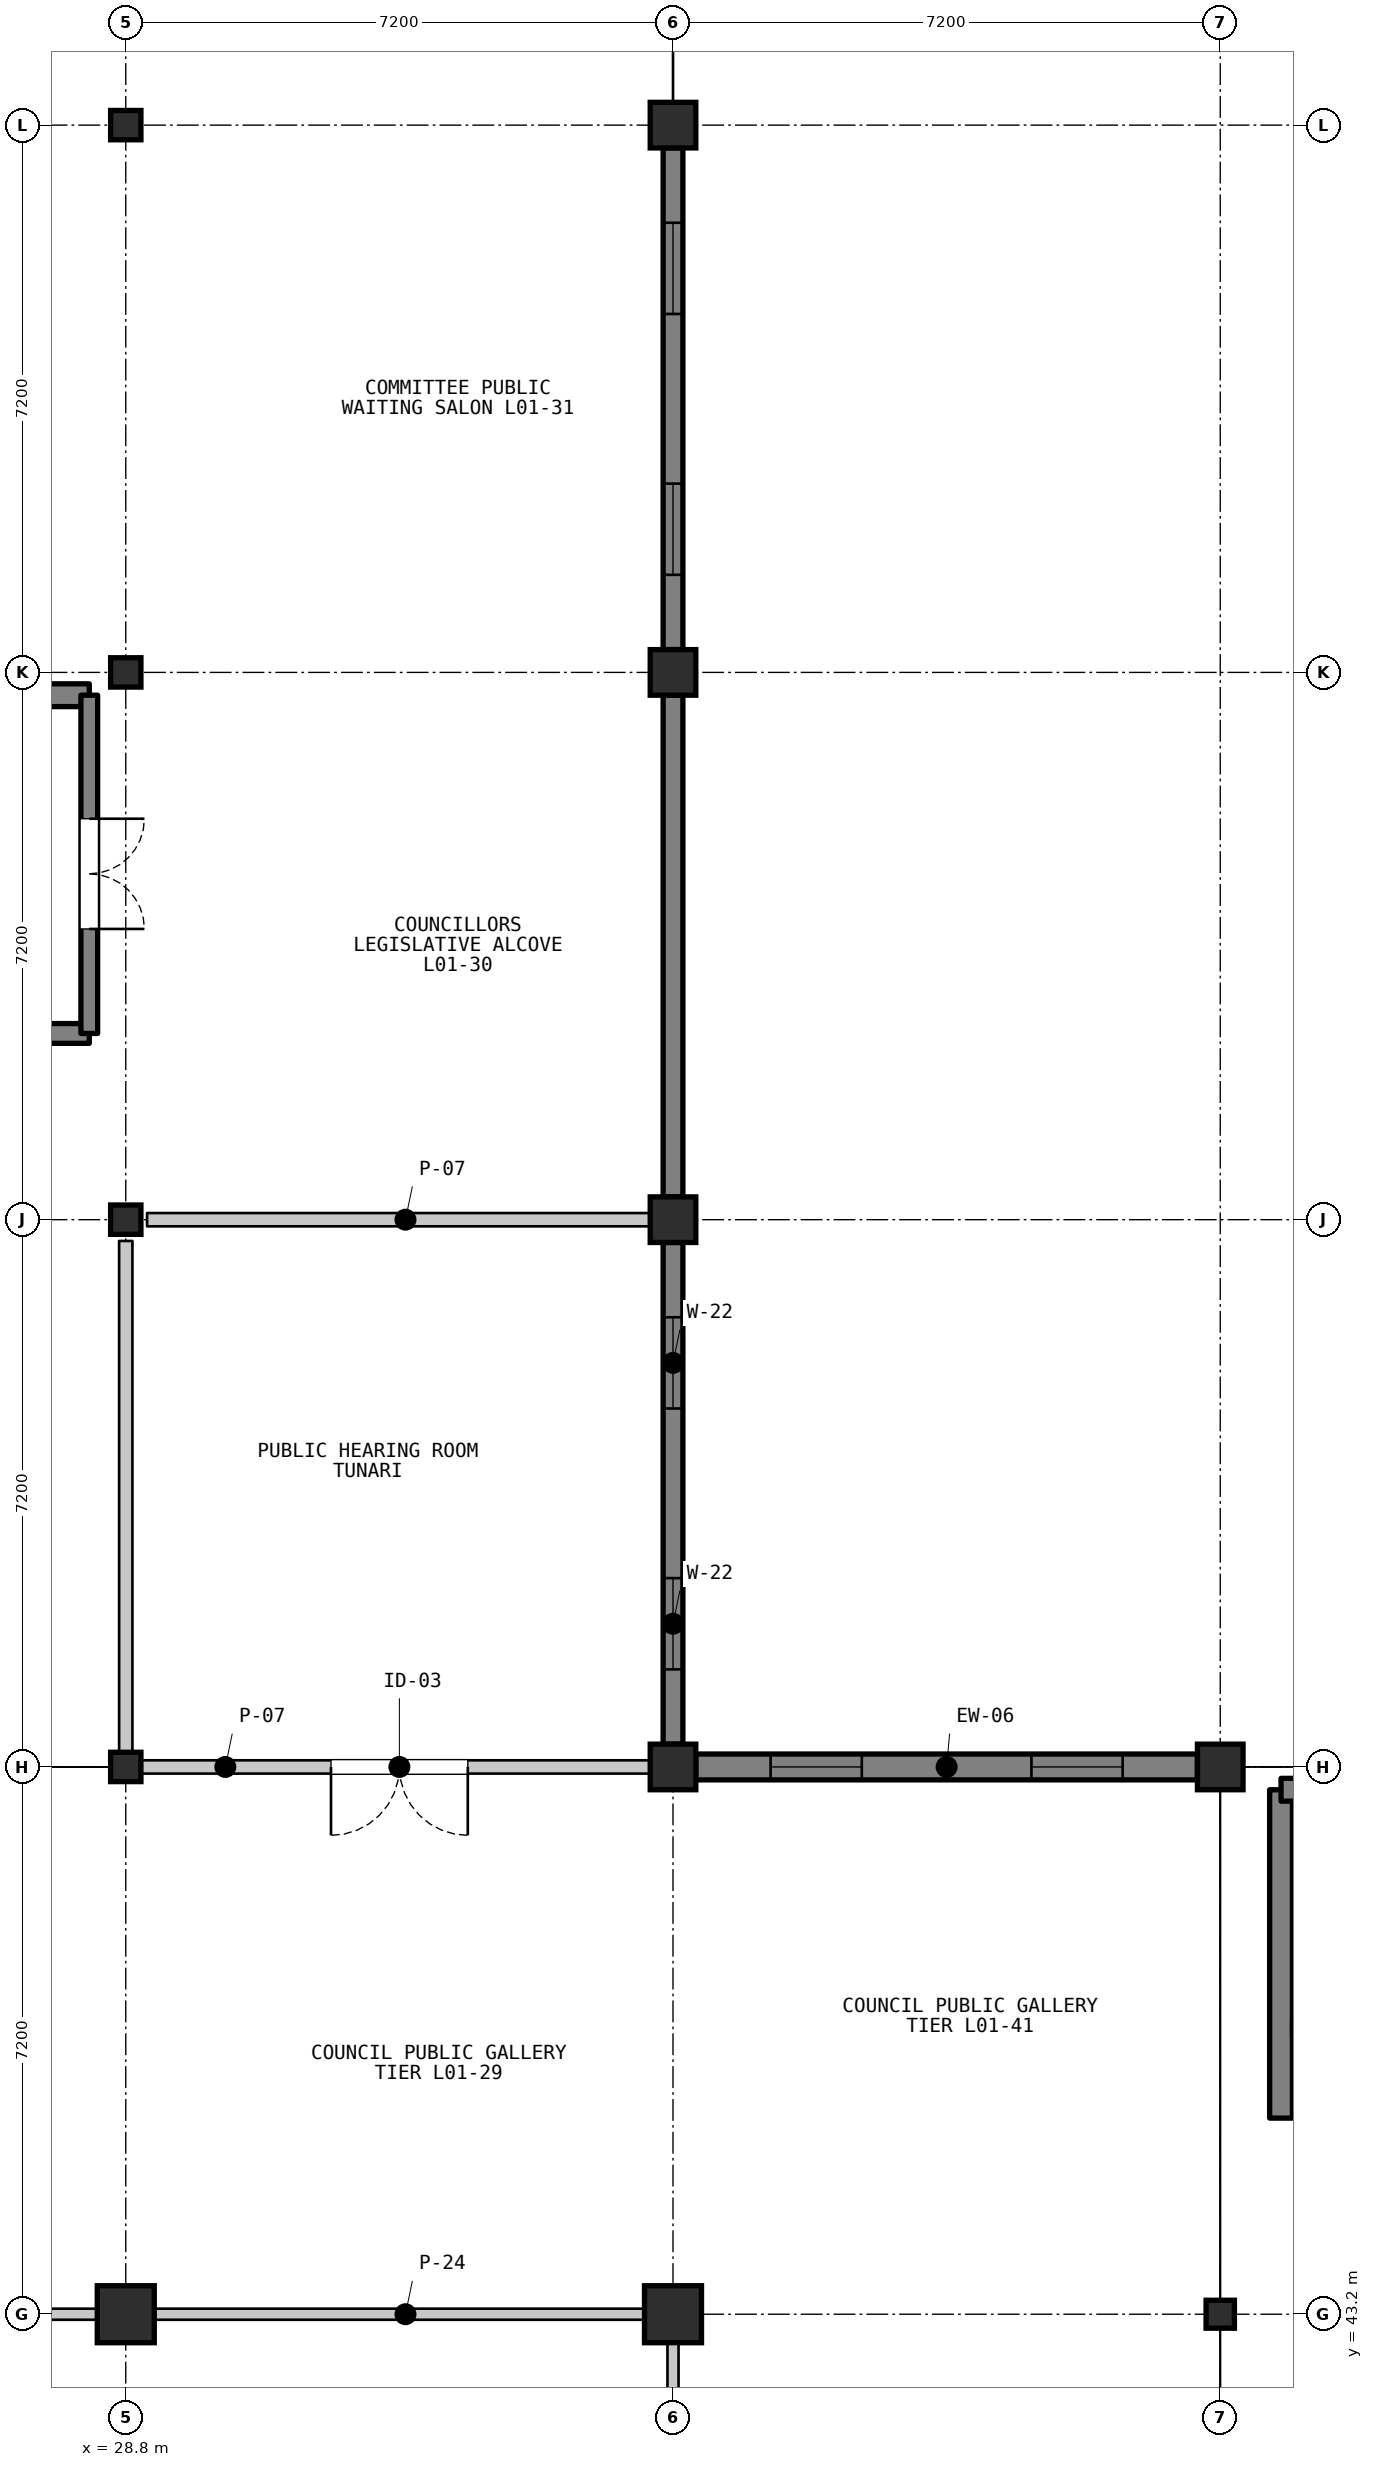
"""IFC4 building model, lengths in metres.
Left out: names, types, materials, properties, quantities, classifications, styles, units other than length and angle.
Written with IfcOpenShell. Run it as: python <this file> out.ifc"""

import sys

from ifc_helpers import new_model, si_unit, direction, frame, frame_2d, origin, origin_2d, place, context, subcontext, project, spatial, rectangle, i_section, extrude, element, fill, save


model = new_model("IFC4")
c1 = context("Model", 3, precision=1e-05, world=origin(), true_north=direction((0.0, 1.0)))
c2 = subcontext(c1, "Body", "Model", "MODEL_VIEW")
j1 = project(units=[si_unit("LENGTHUNIT", "METRE"), si_unit("PLANEANGLEUNIT", "RADIAN")], contexts=[c1])
p1 = place(None, origin())
s1 = spatial("IfcSite", under=j1, at=p1, CompositionType="ELEMENT")
p2 = place(p1, origin())
s2 = spatial("IfcBuilding", under=s1, at=p2, CompositionType="ELEMENT")
p3 = place(p2, origin())
s3 = spatial("IfcBuildingStorey", under=s2, at=p3, CompositionType="ELEMENT", Elevation=0.0)
p4 = place(p3, frame((28.8, 43.2, 0.0), z_axis=(0.0, 0.0, 1.0), x_axis=(1.0, 0.0, 0.0)))
e1 = element("IfcColumn", 1, at=p4, inside=s3, PredefinedType="COLUMN", context=c2, shape_type="SweptSolid", body=[
    extrude(rectangle(XDim=0.75, YDim=0.75, at=origin_2d()), origin(), (0.0, 0.0, 1.0), 5.4),
])
for number, where, z_axis, x_axis in (
    (2, (28.8, 50.4, 0.0), (0.0, 0.0, 1.0), (1.0, 0.0, 0.0)),
    (3, (28.8, 57.6, 0.0), (0.0, 0.0, 1.0), (1.0, 0.0, 0.0)),
    (4, (28.8, 64.8, 0.0), (0.0, 0.0, 1.0), (1.0, 0.0, 0.0)),
    (5, (28.8, 72.0, 0.0), (0.0, 0.0, 1.0), (1.0, 0.0, 0.0)),
):
    element("IfcColumn", number, at=place(p3, frame(where, z_axis=z_axis, x_axis=x_axis)), inside=s3, PredefinedType="COLUMN", context=c2, shape_type="SweptSolid", body=[
        extrude(i_section(OverallWidth=0.399, OverallDepth=0.386, WebThickness=0.021, FlangeThickness=0.033, FilletRadius=0.015, at=origin_2d()), origin(), (0.0, 0.0, 1.0), 5.4),
    ])
p5 = place(p3, frame((36.0, 43.2, 0.0), z_axis=(0.0, 0.0, 1.0), x_axis=(1.0, 0.0, 0.0)))
e6 = element("IfcColumn", 6, at=p5, inside=s3, PredefinedType="COLUMN", context=c2, shape_type="SweptSolid", body=[
    extrude(rectangle(XDim=0.75, YDim=0.75, at=origin_2d()), origin(), (0.0, 0.0, 1.0), 5.4),
])
for number, where, z_axis, x_axis in (
    (7, (36.0, 50.4, 0.0), (0.0, 0.0, 1.0), (1.0, 0.0, 0.0)),
    (8, (36.0, 57.6, 0.0), (0.0, 0.0, 1.0), (1.0, 0.0, 0.0)),
    (9, (36.0, 64.8, 0.0), (0.0, 0.0, 1.0), (1.0, 0.0, 0.0)),
    (10, (36.0, 72.0, 0.0), (0.0, 0.0, 1.0), (1.0, 0.0, 0.0)),
):
    element("IfcColumn", number, at=place(p3, frame(where, z_axis=z_axis, x_axis=x_axis)), inside=s3, PredefinedType="COLUMN", context=c2, shape_type="SweptSolid", body=[
        extrude(rectangle(XDim=0.6, YDim=0.6, at=origin_2d()), origin(), (0.0, 0.0, 1.0), 5.4),
    ])
p6 = place(p3, frame((43.2, 43.2, 0.0), z_axis=(0.0, 0.0, 1.0), x_axis=(1.0, 0.0, 0.0)))
e11 = element("IfcColumn", 11, at=p6, inside=s3, PredefinedType="COLUMN", context=c2, shape_type="SweptSolid", body=[
    extrude(i_section(OverallWidth=0.373, OverallDepth=0.368, WebThickness=0.015, FlangeThickness=0.024, FilletRadius=0.015, at=origin_2d()), origin(), (0.0, 0.0, 1.0), 5.4),
])
p7 = place(p3, frame((43.2, 50.4, 0.0), z_axis=(0.0, 0.0, 1.0), x_axis=(1.0, 0.0, 0.0)))
e12 = element("IfcColumn", 12, at=p7, inside=s3, PredefinedType="COLUMN", context=c2, shape_type="SweptSolid", body=[
    extrude(rectangle(XDim=0.6, YDim=0.6, at=origin_2d()), origin(), (0.0, 0.0, 1.0), 5.4),
])
p8 = place(p3, frame((36.0, 57.3, 0.0), z_axis=(0.0, 0.0, 1.0), x_axis=(0.0, -1.0, 0.0)))
e13 = element("IfcWall", 13, at=p8, inside=s3, PredefinedType="SOLIDWALL", context=c2, shape_type="SweptSolid", body=[
    extrude(rectangle(XDim=6.6, YDim=0.26, at=frame_2d((3.3, 0.0))), origin(), (0.0, 0.0, 1.0), 4.667),
])
p9 = place(p8, frame((0.984, 0.0, 0.95)))
e14 = element("IfcOpeningElement", 14, at=p9, cuts=e13, PredefinedType="OPENING", context=c2, shape_type="SweptSolid", body=[
    extrude(rectangle(XDim=1.2, YDim=1.7, at=frame_2d((0.6, 0.85))), frame((0.0, 0.14, 0.0), z_axis=(0.0, -1.0, 0.0), x_axis=(1.0, 0.0, 0.0)), (0.0, 0.0, 1.0), 0.28),
])
p10 = place(p8, frame((4.416, 0.0, 0.95)))
e15 = element("IfcOpeningElement", 15, at=p10, cuts=e13, PredefinedType="OPENING", context=c2, shape_type="SweptSolid", body=[
    extrude(rectangle(XDim=1.2, YDim=1.7, at=frame_2d((0.6, 0.85))), frame((0.0, 0.14, 0.0), z_axis=(0.0, -1.0, 0.0), x_axis=(1.0, 0.0, 0.0)), (0.0, 0.0, 1.0), 0.28),
])
p11 = place(p3, frame((36.0, 64.5, 0.0), z_axis=(0.0, 0.0, 1.0), x_axis=(0.0, -1.0, 0.0)))
e16 = element("IfcWall", 16, at=p11, inside=s3, PredefinedType="SOLIDWALL", context=c2, shape_type="SweptSolid", body=[
    extrude(rectangle(XDim=6.6, YDim=0.26, at=frame_2d((3.3, 0.0))), origin(), (0.0, 0.0, 1.0), 4.667),
])
p12 = place(p3, frame((36.0, 71.7, 0.0), z_axis=(0.0, 0.0, 1.0), x_axis=(0.0, -1.0, 0.0)))
e17 = element("IfcWall", 17, at=p12, inside=s3, PredefinedType="SOLIDWALL", context=c2, shape_type="SweptSolid", body=[
    extrude(rectangle(XDim=6.6, YDim=0.26, at=frame_2d((3.3, 0.0))), origin(), (0.0, 0.0, 1.0), 4.667),
])
p13 = place(p12, frame((0.984, 0.0, 0.95)))
e18 = element("IfcOpeningElement", 18, at=p13, cuts=e17, PredefinedType="OPENING", context=c2, shape_type="SweptSolid", body=[
    extrude(rectangle(XDim=1.2, YDim=1.7, at=frame_2d((0.6, 0.85))), frame((0.0, 0.14, 0.0), z_axis=(0.0, -1.0, 0.0), x_axis=(1.0, 0.0, 0.0)), (0.0, 0.0, 1.0), 0.28),
])
p14 = place(p12, frame((4.416, 0.0, 0.95)))
e19 = element("IfcOpeningElement", 19, at=p14, cuts=e17, PredefinedType="OPENING", context=c2, shape_type="SweptSolid", body=[
    extrude(rectangle(XDim=1.2, YDim=1.7, at=frame_2d((0.6, 0.85))), frame((0.0, 0.14, 0.0), z_axis=(0.0, -1.0, 0.0), x_axis=(1.0, 0.0, 0.0)), (0.0, 0.0, 1.0), 0.28),
])
p15 = place(p3, frame((36.3, 50.4, 0.0), z_axis=(0.0, 0.0, 1.0), x_axis=(1.0, 0.0, 0.0)))
e20 = element("IfcWall", 20, at=p15, inside=s3, PredefinedType="SOLIDWALL", context=c2, shape_type="SweptSolid", body=[
    extrude(rectangle(XDim=6.6, YDim=0.34, at=frame_2d((3.3, 0.0))), origin(), (0.0, 0.0, 1.0), 4.598),
])
p16 = place(p15, frame((0.984, 0.0, 0.95)))
e21 = element("IfcOpeningElement", 21, at=p16, cuts=e20, PredefinedType="OPENING", context=c2, shape_type="SweptSolid", body=[
    extrude(rectangle(XDim=1.2, YDim=1.7, at=frame_2d((0.6, 0.85))), frame((0.0, 0.18, 0.0), z_axis=(0.0, -1.0, 0.0), x_axis=(1.0, 0.0, 0.0)), (0.0, 0.0, 1.0), 0.36),
])
p17 = place(p15, frame((4.416, 0.0, 0.95)))
e22 = element("IfcOpeningElement", 22, at=p17, cuts=e20, PredefinedType="OPENING", context=c2, shape_type="SweptSolid", body=[
    extrude(rectangle(XDim=1.2, YDim=1.7, at=frame_2d((0.6, 0.85))), frame((0.0, 0.18, 0.0), z_axis=(0.0, -1.0, 0.0), x_axis=(1.0, 0.0, 0.0)), (0.0, 0.0, 1.0), 0.36),
])
p18 = place(p3, frame((44.0, 45.78, 0.0), z_axis=(0.0, 0.0, 1.0), x_axis=(0.0, 1.0, 0.0)))
e23 = element("IfcWall", 23, at=p18, inside=s3, PredefinedType="SHEAR", context=c2, shape_type="SweptSolid", body=[
    extrude(rectangle(XDim=4.32, YDim=0.3, at=frame_2d((2.16, 0.0))), origin(), (0.0, 0.0, 1.0), 5.2),
])
p19 = place(p3, frame((44.0, 50.1, 0.0), z_axis=(0.0, 0.0, 1.0), x_axis=(1.0, 0.0, 0.0)))
e24 = element("IfcWall", 24, at=p19, inside=s3, PredefinedType="SHEAR", context=c2, shape_type="SweptSolid", body=[
    extrude(rectangle(XDim=5.92, YDim=0.3, at=frame_2d((2.96, 0.0))), origin(), (0.0, 0.0, 1.0), 5.2),
])
p20 = place(p3, frame((44.15, 46.95, 0.0), z_axis=(0.0, 0.0, 1.0), x_axis=(1.0, 0.0, 0.0)))
e25 = element("IfcWall", 25, at=p20, inside=s3, PredefinedType="SHEAR", context=c2, shape_type="SweptSolid", body=[
    extrude(rectangle(XDim=2.4, YDim=0.22, at=frame_2d((1.2, 0.0))), origin(), (0.0, 0.0, 1.0), 5.2),
])
p21 = place(p3, frame((22.91, 60.05, 0.0), z_axis=(0.0, 0.0, 1.0), x_axis=(1.0, 0.0, 0.0)))
e26 = element("IfcWall", 26, at=p21, inside=s3, PredefinedType="SHEAR", context=c2, shape_type="SweptSolid", body=[
    extrude(rectangle(XDim=5.41, YDim=0.26, at=frame_2d((2.705, 0.0))), origin(), (0.0, 0.0, 1.0), 5.2),
])
p22 = place(p21, frame((2.84, 0.0, 0.0)))
e27 = element("IfcOpeningElement", 27, at=p22, cuts=e26, PredefinedType="OPENING", context=c2, shape_type="SweptSolid", body=[
    extrude(rectangle(XDim=1.15, YDim=2.15, at=frame_2d((0.575, 1.075))), frame((0.0, 0.14, 0.0), z_axis=(0.0, -1.0, 0.0), x_axis=(1.0, 0.0, 0.0)), (0.0, 0.0, 1.0), 0.28),
])
p23 = place(p3, frame((22.4, 64.5, 0.0), z_axis=(0.0, 0.0, 1.0), x_axis=(1.0, 0.0, 0.0)))
e28 = element("IfcWall", 28, at=p23, inside=s3, PredefinedType="SHEAR", context=c2, shape_type="SweptSolid", body=[
    extrude(rectangle(XDim=5.92, YDim=0.3, at=frame_2d((2.96, 0.0))), origin(), (0.0, 0.0, 1.0), 5.2),
])
p24 = place(p3, frame((28.32, 64.5, 0.0), z_axis=(0.0, 0.0, 1.0), x_axis=(0.0, -1.0, 0.0)))
e29 = element("IfcWall", 29, at=p24, inside=s3, PredefinedType="SHEAR", context=c2, shape_type="SweptSolid", body=[
    extrude(rectangle(XDim=4.45, YDim=0.22, at=frame_2d((2.225, 0.0))), origin(), (0.0, 0.0, 1.0), 5.2),
])
p25 = place(p24, frame((1.625, 0.0, 0.0)))
e30 = element("IfcOpeningElement", 30, at=p25, cuts=e29, PredefinedType="OPENING", context=c2, shape_type="SweptSolid", body=[
    extrude(rectangle(XDim=1.45, YDim=2.2, at=frame_2d((0.725, 1.1))), frame((0.0, 0.12, 0.0), z_axis=(0.0, -1.0, 0.0), x_axis=(1.0, 0.0, 0.0)), (0.0, 0.0, 1.0), 0.24),
])
p26 = place(p3, frame((21.88, 43.2, 0.0), z_axis=(0.0, 0.0, 1.0), x_axis=(1.0, 0.0, 0.0)))
e31 = element("IfcWall", 31, at=p26, inside=s3, PredefinedType="PARTITIONING", context=c2, shape_type="SweptSolid", body=[
    extrude(rectangle(XDim=6.64, YDim=0.146, at=frame_2d((3.32, 0.0))), origin(), (0.0, 0.0, 1.0), 4.588),
])
p27 = place(p3, frame((29.08, 43.2, 0.0), z_axis=(0.0, 0.0, 1.0), x_axis=(1.0, 0.0, 0.0)))
e32 = element("IfcWall", 32, at=p27, inside=s3, PredefinedType="PARTITIONING", context=c2, shape_type="SweptSolid", body=[
    extrude(rectangle(XDim=6.8, YDim=0.146, at=frame_2d((3.4, 0.0))), origin(), (0.0, 0.0, 1.0), 4.588),
])
p28 = place(p3, frame((36.0, 43.08, 0.0), z_axis=(0.0, 0.0, 1.0), x_axis=(0.0, -1.0, 0.0)))
e33 = element("IfcWall", 33, at=p28, inside=s3, PredefinedType="PARTITIONING", context=c2, shape_type="SweptSolid", body=[
    extrude(rectangle(XDim=6.96, YDim=0.146, at=frame_2d((3.48, 0.0))), origin(), (0.0, 0.0, 1.0), 4.588),
])
p29 = place(p3, frame((35.88, 50.4, 0.0), z_axis=(0.0, 0.0, 1.0), x_axis=(-1.0, 0.0, 0.0)))
e34 = element("IfcWall", 34, at=p29, inside=s3, PredefinedType="PARTITIONING", context=c2, shape_type="SweptSolid", body=[
    extrude(rectangle(XDim=6.96, YDim=0.175, at=frame_2d((3.48, 0.0))), origin(), (0.0, 0.0, 1.0), 4.588),
])
p30 = place(p29, frame((2.58, 0.0, 0.0)))
e35 = element("IfcOpeningElement", 35, at=p30, cuts=e34, PredefinedType="OPENING", context=c2, shape_type="SweptSolid", body=[
    extrude(rectangle(XDim=1.8, YDim=2.4, at=frame_2d((0.9, 1.2))), frame((0.0, 0.097, 0.0), z_axis=(0.0, -1.0, 0.0), x_axis=(1.0, 0.0, 0.0)), (0.0, 0.0, 1.0), 0.195),
])
p31 = place(p3, frame((29.08, 57.6, 0.0), z_axis=(0.0, 0.0, 1.0), x_axis=(1.0, 0.0, 0.0)))
e36 = element("IfcWall", 36, at=p31, inside=s3, PredefinedType="PARTITIONING", context=c2, shape_type="SweptSolid", body=[
    extrude(rectangle(XDim=6.8, YDim=0.175, at=frame_2d((3.4, 0.0))), origin(), (0.0, 0.0, 1.0), 4.588),
])
p32 = place(p3, frame((28.8, 50.52, 0.0), z_axis=(0.0, 0.0, 1.0), x_axis=(0.0, 1.0, 0.0)))
e37 = element("IfcWall", 37, at=p32, inside=s3, PredefinedType="PARTITIONING", context=c2, shape_type="SweptSolid", body=[
    extrude(rectangle(XDim=6.8, YDim=0.175, at=frame_2d((3.4, 0.0))), origin(), (0.0, 0.0, 1.0), 4.588),
])
p33 = place(p9, origin())
e38 = element("IfcWindow", 38, at=p33, inside=s3, PartitioningType="SINGLE_PANEL", PredefinedType="WINDOW", context=c2, shape_type="SweptSolid", body=[
    extrude(rectangle(XDim=1.2, YDim=1.7, at=frame_2d((0.6, 0.85))), frame((0.0, 0.03, 0.0), z_axis=(0.0, -1.0, 0.0), x_axis=(1.0, 0.0, 0.0)), (0.0, 0.0, 1.0), 0.06),
])
fill(e14, e38)
p34 = place(p10, origin())
e39 = element("IfcWindow", 39, at=p34, inside=s3, PartitioningType="SINGLE_PANEL", PredefinedType="WINDOW", context=c2, shape_type="SweptSolid", body=[
    extrude(rectangle(XDim=1.2, YDim=1.7, at=frame_2d((0.6, 0.85))), frame((0.0, 0.03, 0.0), z_axis=(0.0, -1.0, 0.0), x_axis=(1.0, 0.0, 0.0)), (0.0, 0.0, 1.0), 0.06),
])
fill(e15, e39)
p35 = place(p13, origin())
e40 = element("IfcWindow", 40, at=p35, inside=s3, PartitioningType="SINGLE_PANEL", PredefinedType="WINDOW", context=c2, shape_type="SweptSolid", body=[
    extrude(rectangle(XDim=1.2, YDim=1.7, at=frame_2d((0.6, 0.85))), frame((0.0, 0.03, 0.0), z_axis=(0.0, -1.0, 0.0), x_axis=(1.0, 0.0, 0.0)), (0.0, 0.0, 1.0), 0.06),
])
fill(e18, e40)
p36 = place(p14, origin())
e41 = element("IfcWindow", 41, at=p36, inside=s3, PartitioningType="SINGLE_PANEL", PredefinedType="WINDOW", context=c2, shape_type="SweptSolid", body=[
    extrude(rectangle(XDim=1.2, YDim=1.7, at=frame_2d((0.6, 0.85))), frame((0.0, 0.03, 0.0), z_axis=(0.0, -1.0, 0.0), x_axis=(1.0, 0.0, 0.0)), (0.0, 0.0, 1.0), 0.06),
])
fill(e19, e41)
p37 = place(p16, origin())
e42 = element("IfcWindow", 42, at=p37, inside=s3, PartitioningType="SINGLE_PANEL", PredefinedType="WINDOW", context=c2, shape_type="SweptSolid", body=[
    extrude(rectangle(XDim=1.2, YDim=1.7, at=frame_2d((0.6, 0.85))), frame((0.0, 0.03, 0.0), z_axis=(0.0, -1.0, 0.0), x_axis=(1.0, 0.0, 0.0)), (0.0, 0.0, 1.0), 0.06),
])
fill(e21, e42)
p38 = place(p17, origin())
e43 = element("IfcWindow", 43, at=p38, inside=s3, PartitioningType="SINGLE_PANEL", PredefinedType="WINDOW", context=c2, shape_type="SweptSolid", body=[
    extrude(rectangle(XDim=1.2, YDim=1.7, at=frame_2d((0.6, 0.85))), frame((0.0, 0.03, 0.0), z_axis=(0.0, -1.0, 0.0), x_axis=(1.0, 0.0, 0.0)), (0.0, 0.0, 1.0), 0.06),
])
fill(e22, e43)
p39 = place(p25, origin())
e44 = element("IfcDoor", 44, at=p39, inside=s3, OperationType="DOUBLE_DOOR_SINGLE_SWING", PredefinedType="DOOR", context=c2, shape_type="SweptSolid", body=[
    extrude(rectangle(XDim=1.45, YDim=2.2, at=frame_2d((0.725, 1.1))), frame((0.0, 0.025, 0.0), z_axis=(0.0, -1.0, 0.0), x_axis=(1.0, 0.0, 0.0)), (0.0, 0.0, 1.0), 0.05),
])
fill(e30, e44)
p40 = place(p30, origin())
e45 = element("IfcDoor", 45, at=p40, inside=s3, OperationType="DOUBLE_DOOR_SINGLE_SWING", PredefinedType="DOOR", context=c2, shape_type="SweptSolid", body=[
    extrude(rectangle(XDim=1.8, YDim=2.4, at=frame_2d((0.9, 1.2))), frame((0.0, 0.025, 0.0), z_axis=(0.0, -1.0, 0.0), x_axis=(1.0, 0.0, 0.0)), (0.0, 0.0, 1.0), 0.05),
])
fill(e35, e45)
save(model, sys.argv[1])
